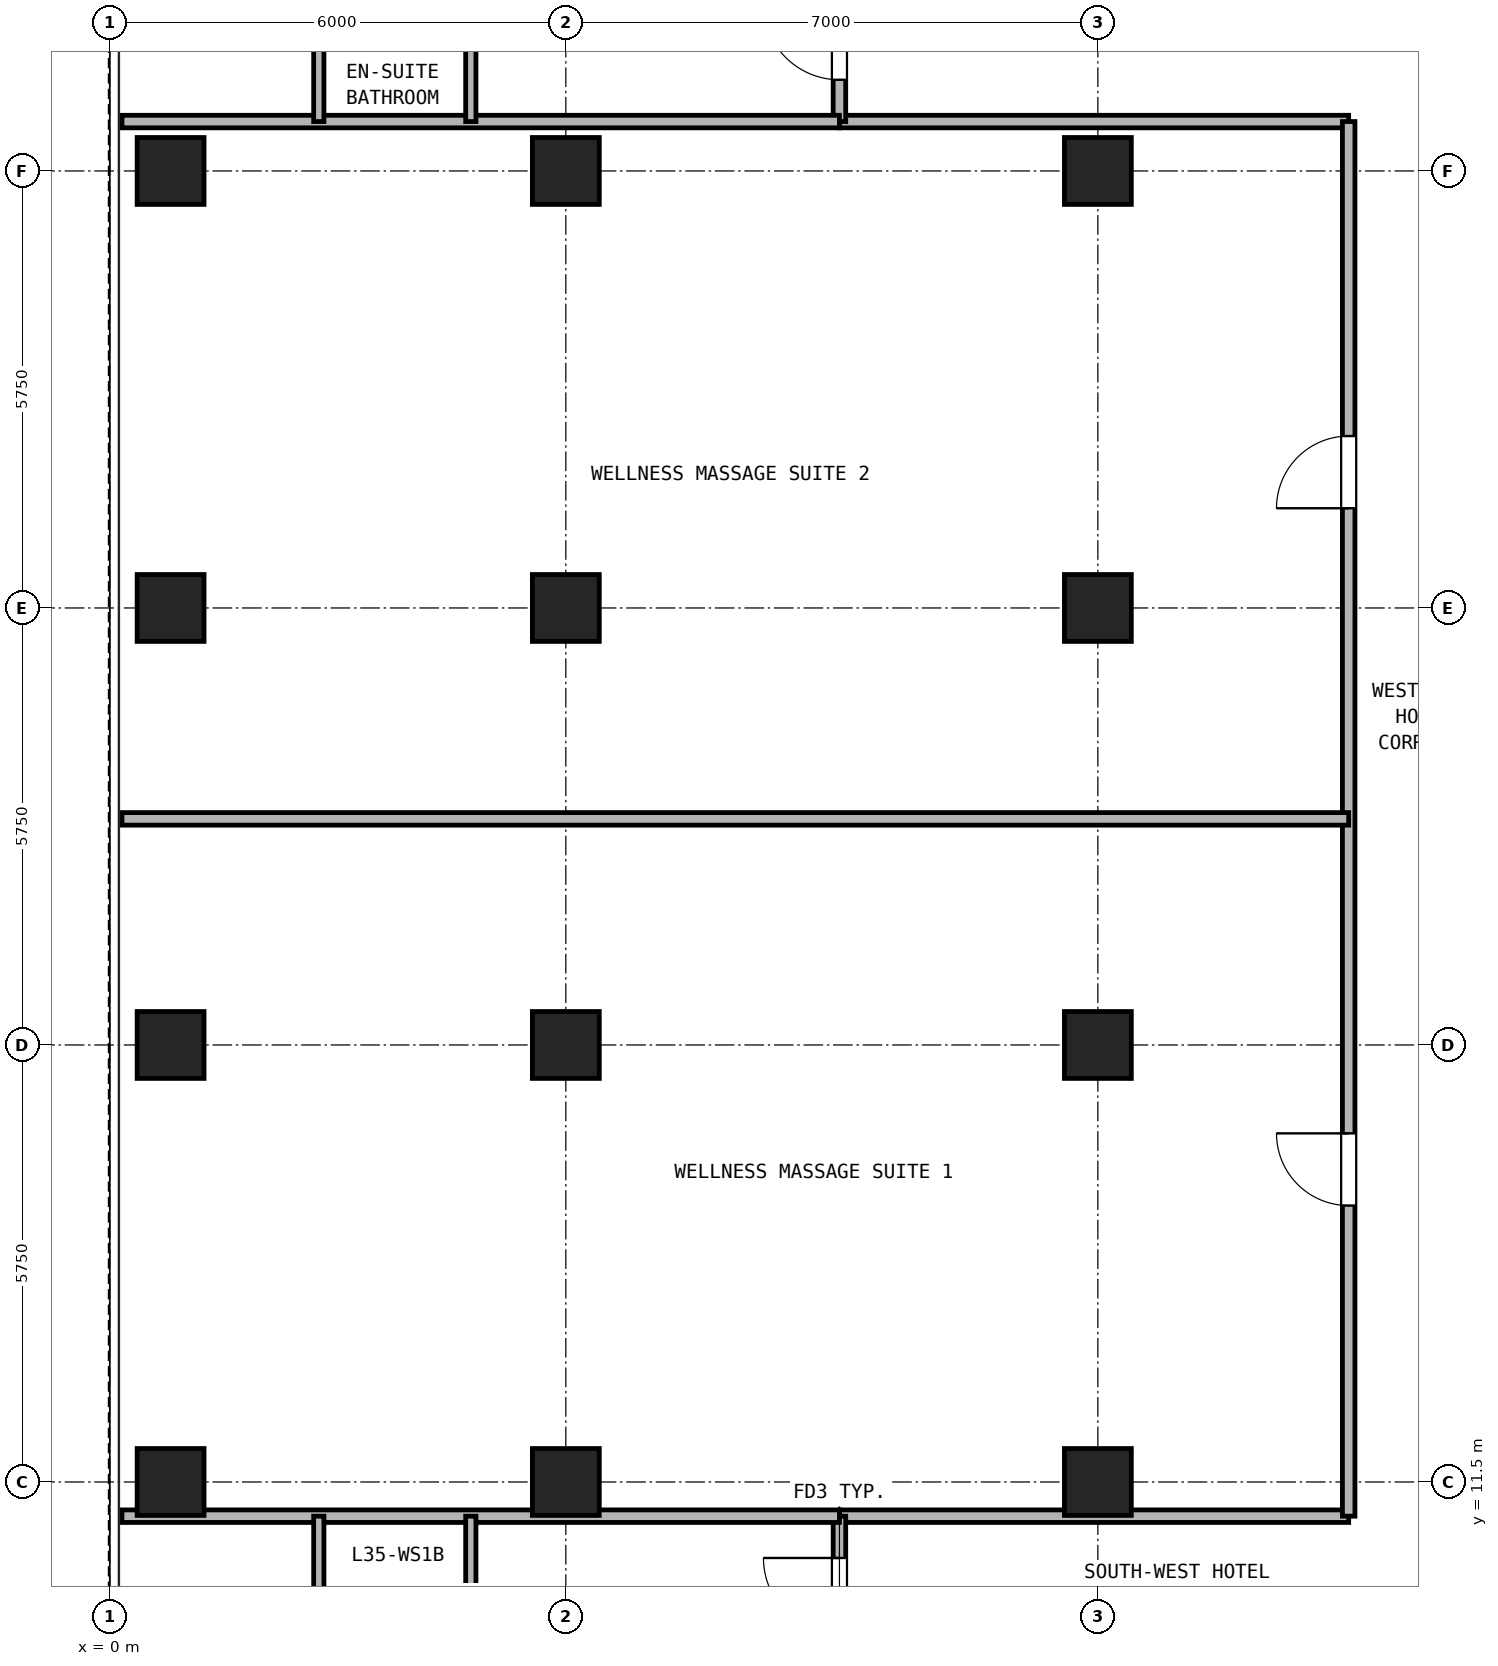
"""IFC4 building model, lengths in metres.
Left out: names, types, materials, properties, quantities, classifications, styles, units other than length and angle.
Written with IfcOpenShell. Run it as: python <this file> out.ifc"""

import sys

from ifc_helpers import new_model, si_unit, direction, frame, frame_2d, origin, origin_2d, place, context, subcontext, project, spatial, rectangle, hollow_rectangle, extrude, source, transform, mapped, element, fill, save


model = new_model("IFC4")
c1 = context("Model", 3, precision=1e-05, world=origin(), true_north=direction((0.0, 1.0)))
c2 = subcontext(c1, "Body", "Model", "MODEL_VIEW")
j1 = project(units=[si_unit("LENGTHUNIT", "METRE"), si_unit("PLANEANGLEUNIT", "RADIAN")], contexts=[c1])
p1 = place(None, origin())
s1 = spatial("IfcSite", under=j1, at=p1, CompositionType="ELEMENT")
p2 = place(p1, origin())
s2 = spatial("IfcBuilding", under=s1, at=p2, CompositionType="ELEMENT")
p3 = place(p2, frame((0.0, 0.0, 127.9)))
s3 = spatial("IfcBuildingStorey", under=s2, at=p3, CompositionType="ELEMENT", Elevation=127.9)
m1 = source(origin(), c2, "Body", "SweptSolid", [
    extrude(hollow_rectangle(XDim=0.88, YDim=0.88, WallThickness=0.05, at=origin_2d()), origin(), (0.0, 0.0, 1.0), 2.95),
])
for number, where, z_axis, x_axis in (
    (1, (0.8, 11.5, 0.0), (0.0, 0.0, 1.0), (1.0, 0.0, 0.0)),
    (2, (0.8, 17.25, 0.0), (0.0, 0.0, 1.0), (1.0, 0.0, 0.0)),
    (3, (0.8, 23.0, 0.0), (0.0, 0.0, 1.0), (1.0, 0.0, 0.0)),
    (4, (0.8, 28.75, 0.0), (0.0, 0.0, 1.0), (1.0, 0.0, 0.0)),
    (5, (6.0, 11.5, 0.0), (0.0, 0.0, 1.0), (1.0, 0.0, 0.0)),
    (6, (6.0, 17.25, 0.0), (0.0, 0.0, 1.0), (1.0, 0.0, 0.0)),
    (7, (6.0, 23.0, 0.0), (0.0, 0.0, 1.0), (1.0, 0.0, 0.0)),
    (8, (6.0, 28.75, 0.0), (0.0, 0.0, 1.0), (1.0, 0.0, 0.0)),
    (9, (13.0, 11.5, 0.0), (0.0, 0.0, 1.0), (1.0, 0.0, 0.0)),
    (10, (13.0, 17.25, 0.0), (0.0, 0.0, 1.0), (1.0, 0.0, 0.0)),
    (11, (13.0, 23.0, 0.0), (0.0, 0.0, 1.0), (1.0, 0.0, 0.0)),
    (12, (13.0, 28.75, 0.0), (0.0, 0.0, 1.0), (1.0, 0.0, 0.0)),
):
    element("IfcColumn", number, at=place(p3, frame(where, z_axis=z_axis, x_axis=x_axis)), inside=s3, PredefinedType="COLUMN", context=c2, shape_type="MappedRepresentation", body=[
        mapped(m1, transform((0.0, 0.0, 0.0), x_axis=(1.0, 0.0, 0.0), y_axis=(0.0, 1.0, 0.0), z_axis=(0.0, 0.0, 1.0), scale=1.0)),
    ])
for number, where, z_axis, x_axis in (
    (13, (9.6, 11.05, 0.0), (0.0, 0.0, 1.0), (1.0, 0.0, 0.0)),
    (14, (9.6, 29.4, 0.0), (0.0, 0.0, 1.0), (1.0, 0.0, 0.0)),
):
    element("IfcWall", number, at=place(p3, frame(where, z_axis=z_axis, x_axis=x_axis)), inside=s3, PredefinedType="PARTITIONING", context=c2, shape_type="SweptSolid", body=[
        extrude(rectangle(XDim=6.7, YDim=0.165, at=frame_2d((3.35, 0.0))), origin(), (0.0, 0.0, 1.0), 2.95),
    ])
p4 = place(p3, frame((16.3, 11.05, 0.0), z_axis=(0.0, 0.0, 1.0), x_axis=(0.0, 1.0, 0.0)))
e15 = element("IfcWall", 15, at=p4, inside=s3, PredefinedType="PARTITIONING", context=c2, shape_type="SweptSolid", body=[
    extrude(rectangle(XDim=18.35, YDim=0.165, at=frame_2d((9.175, 0.0))), origin(), (0.0, 0.0, 1.0), 2.95),
])
p5 = place(p4, frame((4.087, 0.0, 0.0)))
e16 = element("IfcOpeningElement", 16, at=p5, cuts=e15, PredefinedType="OPENING", context=c2, shape_type="SweptSolid", body=[
    extrude(rectangle(XDim=0.95, YDim=2.15, at=frame_2d((0.475, 1.075))), frame((0.0, 0.093, 0.0), z_axis=(0.0, -1.0, 0.0), x_axis=(1.0, 0.0, 0.0)), (0.0, 0.0, 1.0), 0.185),
])
p6 = place(p4, frame((13.262, 0.0, 0.0)))
e17 = element("IfcOpeningElement", 17, at=p6, cuts=e15, PredefinedType="OPENING", context=c2, shape_type="SweptSolid", body=[
    extrude(rectangle(XDim=0.95, YDim=2.15, at=frame_2d((0.475, 1.075))), frame((0.0, 0.093, 0.0), z_axis=(0.0, -1.0, 0.0), x_axis=(1.0, 0.0, 0.0)), (0.0, 0.0, 1.0), 0.185),
])
p7 = place(p3, frame((9.6, 0.16, 0.0), z_axis=(0.0, 0.0, 1.0), x_axis=(0.0, 1.0, 0.0)))
e18 = element("IfcWall", 18, at=p7, inside=s3, PredefinedType="PARTITIONING", context=c2, shape_type="SweptSolid", body=[
    extrude(rectangle(XDim=10.89, YDim=0.165, at=frame_2d((5.445, 0.0))), origin(), (0.0, 0.0, 1.0), 2.95),
])
p8 = place(p7, frame((9.34, 0.0, 0.0)))
e19 = element("IfcOpeningElement", 19, at=p8, cuts=e18, PredefinedType="OPENING", context=c2, shape_type="SweptSolid", body=[
    extrude(rectangle(XDim=1.0, YDim=2.15, at=frame_2d((0.5, 1.075))), frame((0.0, 0.093, 0.0), z_axis=(0.0, -1.0, 0.0), x_axis=(1.0, 0.0, 0.0)), (0.0, 0.0, 1.0), 0.185),
])
p9 = place(p3, frame((9.6, 29.4, 0.0), z_axis=(0.0, 0.0, 1.0), x_axis=(0.0, 1.0, 0.0)))
e20 = element("IfcWall", 20, at=p9, inside=s3, PredefinedType="PARTITIONING", context=c2, shape_type="SweptSolid", body=[
    extrude(rectangle(XDim=5.74, YDim=0.165, at=frame_2d((2.87, 0.0))), origin(), (0.0, 0.0, 1.0), 2.95),
])
p10 = place(p9, frame((0.55, 0.0, 0.0)))
e21 = element("IfcOpeningElement", 21, at=p10, cuts=e20, PredefinedType="OPENING", context=c2, shape_type="SweptSolid", body=[
    extrude(rectangle(XDim=1.0, YDim=2.15, at=frame_2d((0.5, 1.075))), frame((0.0, 0.093, 0.0), z_axis=(0.0, -1.0, 0.0), x_axis=(1.0, 0.0, 0.0)), (0.0, 0.0, 1.0), 0.185),
])
for number, where, z_axis, x_axis in (
    (22, (0.16, 11.05, 0.0), (0.0, 0.0, 1.0), (1.0, 0.0, 0.0)),
    (23, (0.16, 29.4, 0.0), (0.0, 0.0, 1.0), (1.0, 0.0, 0.0)),
):
    element("IfcWall", number, at=place(p3, frame(where, z_axis=z_axis, x_axis=x_axis)), inside=s3, PredefinedType="PARTITIONING", context=c2, shape_type="SweptSolid", body=[
        extrude(rectangle(XDim=9.44, YDim=0.165, at=frame_2d((4.72, 0.0))), origin(), (0.0, 0.0, 1.0), 2.95),
    ])
for number, where, z_axis, x_axis in (
    (24, (2.75, 8.95, 0.0), (0.0, 0.0, 1.0), (0.0, 1.0, 0.0)),
    (25, (4.75, 8.95, 0.0), (0.0, 0.0, 1.0), (0.0, 1.0, 0.0)),
    (26, (2.75, 29.4, 0.0), (0.0, 0.0, 1.0), (0.0, 1.0, 0.0)),
    (27, (4.75, 29.4, 0.0), (0.0, 0.0, 1.0), (0.0, 1.0, 0.0)),
):
    element("IfcWall", number, at=place(p3, frame(where, z_axis=z_axis, x_axis=x_axis)), inside=s3, PredefinedType="PARTITIONING", context=c2, shape_type="SweptSolid", body=[
        extrude(rectangle(XDim=2.1, YDim=0.135, at=frame_2d((1.05, 0.0))), origin(), (0.0, 0.0, 1.0), 2.95),
    ])
p11 = place(p3, frame((0.16, 20.225, 0.0), z_axis=(0.0, 0.0, 1.0), x_axis=(1.0, 0.0, 0.0)))
e28 = element("IfcWall", 28, at=p11, inside=s3, PredefinedType="PARTITIONING", context=c2, shape_type="SweptSolid", body=[
    extrude(rectangle(XDim=16.14, YDim=0.165, at=frame_2d((8.07, 0.0))), origin(), (0.0, 0.0, 1.0), 2.583),
])
p12 = place(p8, origin())
e29 = element("IfcDoor", 29, at=p12, inside=s3, OperationType="SINGLE_SWING_RIGHT", PredefinedType="DOOR", context=c2, shape_type="SweptSolid", body=[
    extrude(rectangle(XDim=1.0, YDim=2.15, at=frame_2d((0.5, 1.075))), frame((0.0, 0.025, 0.0), z_axis=(0.0, -1.0, 0.0), x_axis=(1.0, 0.0, 0.0)), (0.0, 0.0, 1.0), 0.05),
])
fill(e19, e29)
p13 = place(p10, origin())
e30 = element("IfcDoor", 30, at=p13, inside=s3, OperationType="SINGLE_SWING_RIGHT", PredefinedType="DOOR", context=c2, shape_type="SweptSolid", body=[
    extrude(rectangle(XDim=1.0, YDim=2.15, at=frame_2d((0.5, 1.075))), frame((0.0, 0.025, 0.0), z_axis=(0.0, -1.0, 0.0), x_axis=(1.0, 0.0, 0.0)), (0.0, 0.0, 1.0), 0.05),
])
fill(e21, e30)
p14 = place(p5, frame((0.95, 0.0, 0.0), z_axis=(0.0, 0.0, 1.0), x_axis=(-1.0, 0.0, 0.0)))
e31 = element("IfcDoor", 31, at=p14, inside=s3, OperationType="SINGLE_SWING_RIGHT", PredefinedType="DOOR", context=c2, shape_type="SweptSolid", body=[
    extrude(rectangle(XDim=0.95, YDim=2.15, at=frame_2d((0.475, 1.075))), frame((0.0, 0.025, 0.0), z_axis=(0.0, -1.0, 0.0), x_axis=(1.0, 0.0, 0.0)), (0.0, 0.0, 1.0), 0.05),
])
fill(e16, e31)
p15 = place(p6, frame((0.95, 0.0, 0.0), z_axis=(0.0, 0.0, 1.0), x_axis=(-1.0, 0.0, 0.0)))
e32 = element("IfcDoor", 32, at=p15, inside=s3, OperationType="SINGLE_SWING_LEFT", PredefinedType="DOOR", context=c2, shape_type="SweptSolid", body=[
    extrude(rectangle(XDim=0.95, YDim=2.15, at=frame_2d((0.475, 1.075))), frame((0.0, 0.025, 0.0), z_axis=(0.0, -1.0, 0.0), x_axis=(1.0, 0.0, 0.0)), (0.0, 0.0, 1.0), 0.05),
])
fill(e17, e32)
save(model, sys.argv[1])
